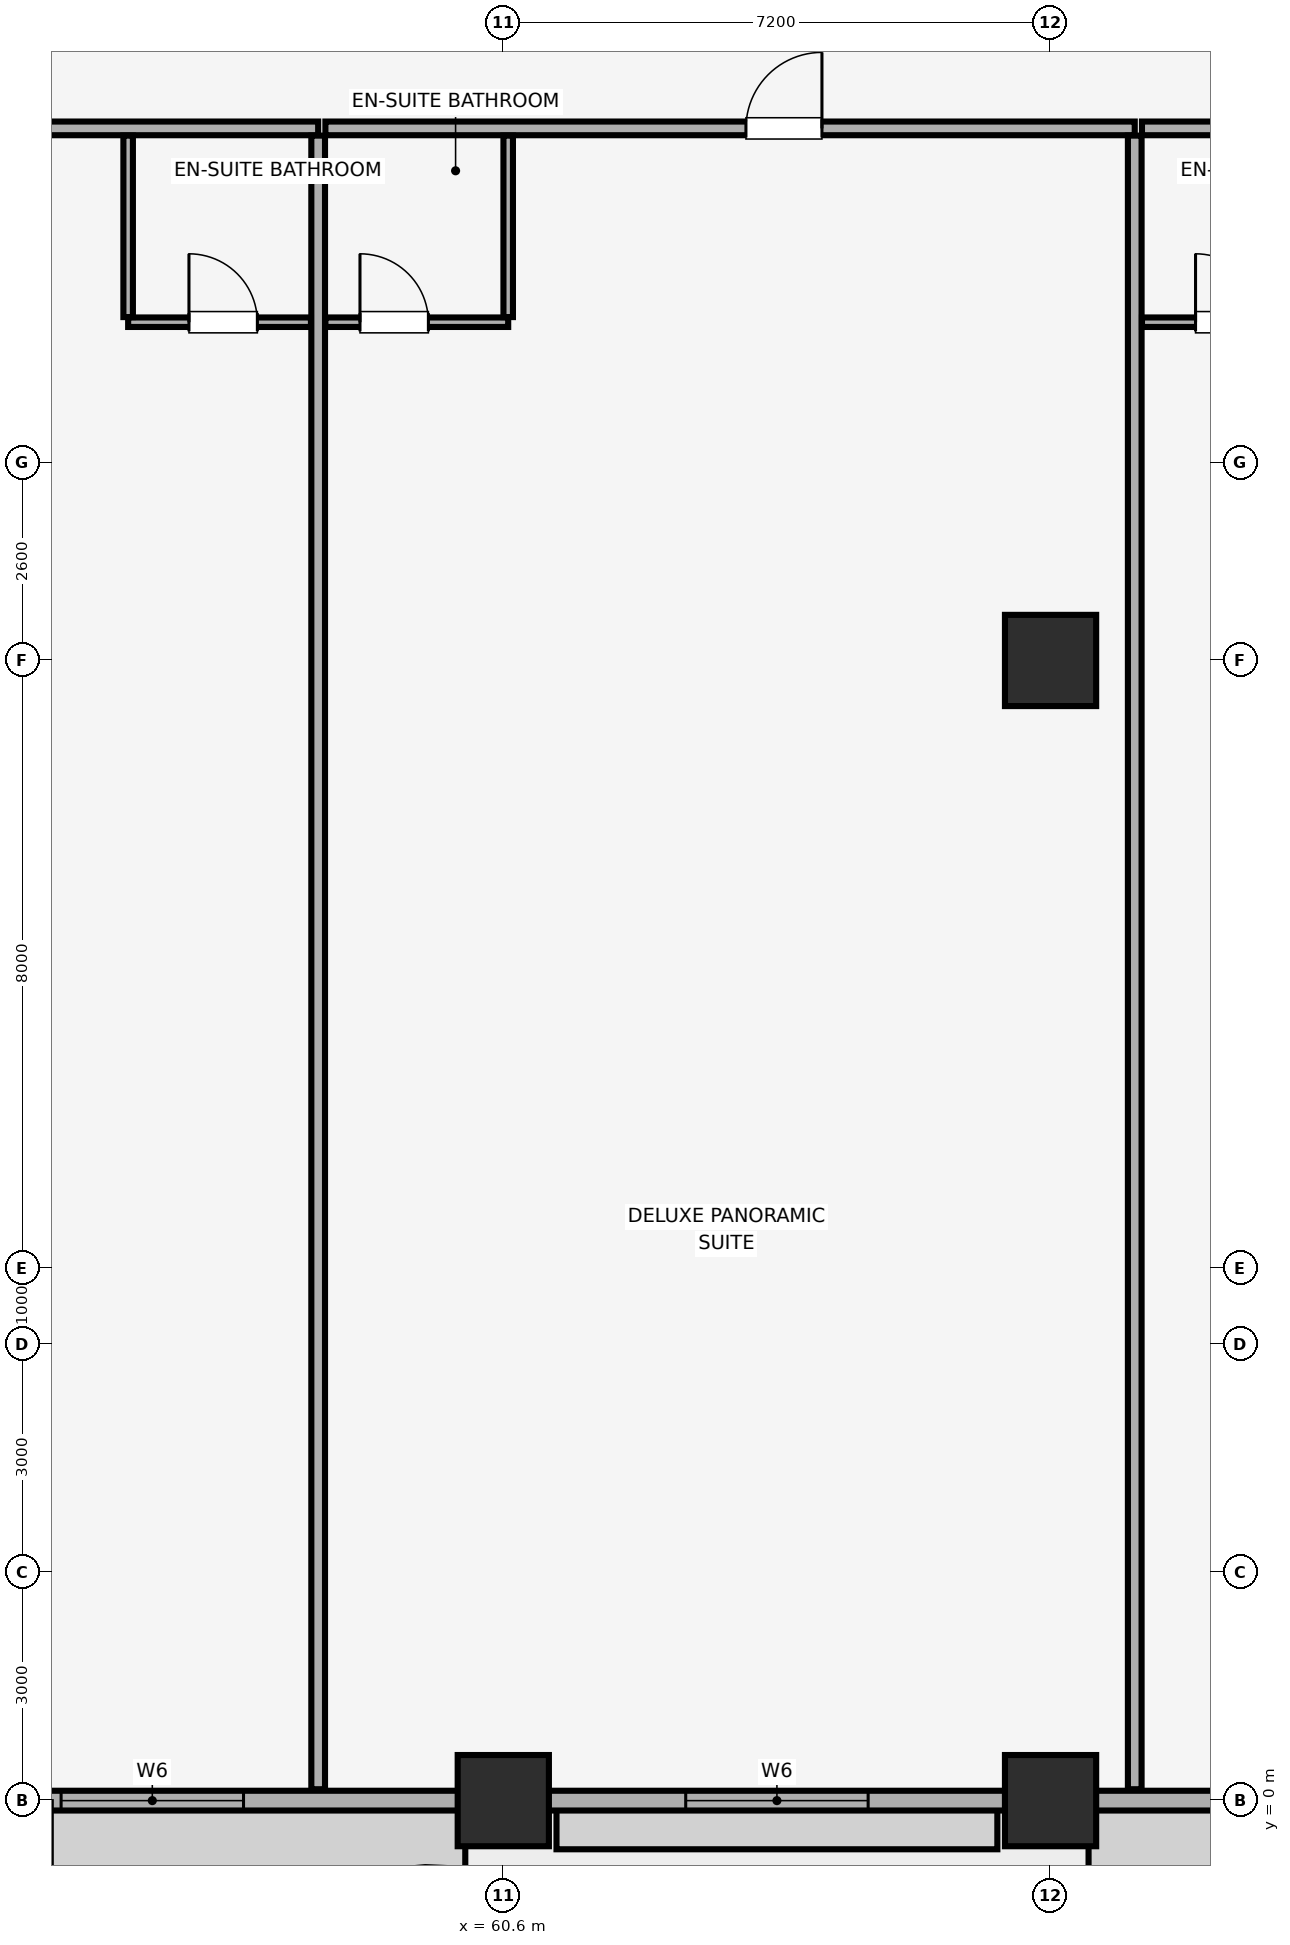
"""IFC4 building model, lengths in metres.
Left out: names, types, materials, properties, quantities, classifications, styles, units other than length and angle.
Written with IfcOpenShell. Run it as: python <this file> out.ifc"""

import sys

from ifc_helpers import new_model, si_unit, direction, frame, frame_2d, origin, origin_2d, place, context, subcontext, project, spatial, rectangle, extrude, element, fill, save


model = new_model("IFC4")
c1 = context("Model", 3, precision=1e-05, world=origin(), true_north=direction((0.0, 1.0)))
c2 = subcontext(c1, "Body", "Model", "MODEL_VIEW")
j1 = project(units=[si_unit("LENGTHUNIT", "METRE"), si_unit("PLANEANGLEUNIT", "RADIAN")], contexts=[c1])
p1 = place(None, origin())
s1 = spatial("IfcSite", under=j1, at=p1, CompositionType="ELEMENT")
p2 = place(p1, origin())
s2 = spatial("IfcBuilding", under=s1, at=p2, CompositionType="ELEMENT")
p3 = place(p2, frame((0.0, 0.0, 104.3)))
s3 = spatial("IfcBuildingStorey", under=s2, at=p3, CompositionType="ELEMENT", Elevation=104.3)
for number, where, z_axis, x_axis in (
    (1, (60.6, 0.0, 0.0), (0.0, 0.0, 1.0), (1.0, 0.0, 0.0)),
    (2, (67.8, 0.0, 0.0), (0.0, 0.0, 1.0), (1.0, 0.0, 0.0)),
    (3, (67.8, 15.0, 0.0), (0.0, 0.0, 1.0), (1.0, 0.0, 0.0)),
):
    element("IfcColumn", number, at=place(p3, frame(where, z_axis=z_axis, x_axis=x_axis)), inside=s3, PredefinedType="COLUMN", context=c2, shape_type="SweptSolid", body=[
        extrude(rectangle(XDim=1.2, YDim=1.2, at=origin_2d()), origin(), (0.0, 0.0, 1.0), 3.51),
    ])
p4 = place(p3, frame((4.2, 0.0, 0.0), z_axis=(0.0, 0.0, 1.0), x_axis=(1.0, 0.0, 0.0)))
e4 = element("IfcWall", 4, at=p4, inside=s3, PredefinedType="SOLIDWALL", context=c2, shape_type="SweptSolid", body=[
    extrude(rectangle(XDim=75.6, YDim=0.26, at=frame_2d((37.8, 0.0))), origin(), (0.0, 0.0, 1.0), 2.56),
])
p5 = place(p4, frame((22.948, 0.0, 0.0)))
e5 = element("IfcOpeningElement", 5, at=p5, cuts=e4, PredefinedType="OPENING", context=c2, shape_type="SweptSolid", body=[
    extrude(rectangle(XDim=1.1, YDim=2.15, at=frame_2d((0.55, 1.075))), frame((0.0, 0.14, 0.0), z_axis=(0.0, -1.0, 0.0), x_axis=(1.0, 0.0, 0.0)), (0.0, 0.0, 1.0), 0.28),
])
p6 = place(p4, frame((44.61, 0.0, 0.0)))
e6 = element("IfcOpeningElement", 6, at=p6, cuts=e4, PredefinedType="OPENING", context=c2, shape_type="SweptSolid", body=[
    extrude(rectangle(XDim=1.1, YDim=2.15, at=frame_2d((0.55, 1.075))), frame((0.0, 0.14, 0.0), z_axis=(0.0, -1.0, 0.0), x_axis=(1.0, 0.0, 0.0)), (0.0, 0.0, 1.0), 0.28),
])
p7 = place(p4, frame((66.272, 0.0, 0.0)))
e7 = element("IfcOpeningElement", 7, at=p7, cuts=e4, PredefinedType="OPENING", context=c2, shape_type="SweptSolid", body=[
    extrude(rectangle(XDim=1.1, YDim=2.15, at=frame_2d((0.55, 1.075))), frame((0.0, 0.14, 0.0), z_axis=(0.0, -1.0, 0.0), x_axis=(1.0, 0.0, 0.0)), (0.0, 0.0, 1.0), 0.28),
])
p8 = place(p4, frame((1.035, 0.0, 0.85)))
e8 = element("IfcOpeningElement", 8, at=p8, cuts=e4, PredefinedType="OPENING", context=c2, shape_type="SweptSolid", body=[
    extrude(rectangle(XDim=2.4, YDim=1.5, at=frame_2d((1.2, 0.75))), frame((0.0, 0.14, 0.0), z_axis=(0.0, -1.0, 0.0), x_axis=(1.0, 0.0, 0.0)), (0.0, 0.0, 1.0), 0.28),
])
p9 = place(p4, frame((6.896, 0.0, 0.85)))
e9 = element("IfcOpeningElement", 9, at=p9, cuts=e4, PredefinedType="OPENING", context=c2, shape_type="SweptSolid", body=[
    extrude(rectangle(XDim=2.4, YDim=1.5, at=frame_2d((1.2, 0.75))), frame((0.0, 0.14, 0.0), z_axis=(0.0, -1.0, 0.0), x_axis=(1.0, 0.0, 0.0)), (0.0, 0.0, 1.0), 0.28),
])
p10 = place(p4, frame((14.4, 0.0, 0.85)))
e10 = element("IfcOpeningElement", 10, at=p10, cuts=e4, PredefinedType="OPENING", context=c2, shape_type="SweptSolid", body=[
    extrude(rectangle(XDim=2.4, YDim=1.5, at=frame_2d((1.2, 0.75))), frame((0.0, 0.14, 0.0), z_axis=(0.0, -1.0, 0.0), x_axis=(1.0, 0.0, 0.0)), (0.0, 0.0, 1.0), 0.28),
])
p11 = place(p4, frame((28.439, 0.0, 0.85)))
e11 = element("IfcOpeningElement", 11, at=p11, cuts=e4, PredefinedType="OPENING", context=c2, shape_type="SweptSolid", body=[
    extrude(rectangle(XDim=2.4, YDim=1.5, at=frame_2d((1.2, 0.75))), frame((0.0, 0.14, 0.0), z_axis=(0.0, -1.0, 0.0), x_axis=(1.0, 0.0, 0.0)), (0.0, 0.0, 1.0), 0.28),
])
p12 = place(p4, frame((36.6, 0.0, 0.85)))
e12 = element("IfcOpeningElement", 12, at=p12, cuts=e4, PredefinedType="OPENING", context=c2, shape_type="SweptSolid", body=[
    extrude(rectangle(XDim=2.4, YDim=1.5, at=frame_2d((1.2, 0.75))), frame((0.0, 0.14, 0.0), z_axis=(0.0, -1.0, 0.0), x_axis=(1.0, 0.0, 0.0)), (0.0, 0.0, 1.0), 0.28),
])
p13 = place(p4, frame((46.59, 0.0, 0.85)))
e13 = element("IfcOpeningElement", 13, at=p13, cuts=e4, PredefinedType="OPENING", context=c2, shape_type="SweptSolid", body=[
    extrude(rectangle(XDim=1.5, YDim=1.4, at=frame_2d((0.75, 0.7))), frame((0.0, 0.14, 0.0), z_axis=(0.0, -1.0, 0.0), x_axis=(1.0, 0.0, 0.0)), (0.0, 0.0, 1.0), 0.28),
])
p14 = place(p4, frame((50.583, 0.0, 0.85)))
e14 = element("IfcOpeningElement", 14, at=p14, cuts=e4, PredefinedType="OPENING", context=c2, shape_type="SweptSolid", body=[
    extrude(rectangle(XDim=2.4, YDim=1.5, at=frame_2d((1.2, 0.75))), frame((0.0, 0.14, 0.0), z_axis=(0.0, -1.0, 0.0), x_axis=(1.0, 0.0, 0.0)), (0.0, 0.0, 1.0), 0.28),
])
p15 = place(p4, frame((58.8, 0.0, 0.85)))
e15 = element("IfcOpeningElement", 15, at=p15, cuts=e4, PredefinedType="OPENING", context=c2, shape_type="SweptSolid", body=[
    extrude(rectangle(XDim=2.4, YDim=1.5, at=frame_2d((1.2, 0.75))), frame((0.0, 0.14, 0.0), z_axis=(0.0, -1.0, 0.0), x_axis=(1.0, 0.0, 0.0)), (0.0, 0.0, 1.0), 0.28),
])
p16 = place(p4, frame((68.221, 0.0, 0.85)))
e16 = element("IfcOpeningElement", 16, at=p16, cuts=e4, PredefinedType="OPENING", context=c2, shape_type="SweptSolid", body=[
    extrude(rectangle(XDim=1.5, YDim=1.4, at=frame_2d((0.75, 0.7))), frame((0.0, 0.14, 0.0), z_axis=(0.0, -1.0, 0.0), x_axis=(1.0, 0.0, 0.0)), (0.0, 0.0, 1.0), 0.28),
])
p17 = place(p4, frame((72.165, 0.0, 0.85)))
e17 = element("IfcOpeningElement", 17, at=p17, cuts=e4, PredefinedType="OPENING", context=c2, shape_type="SweptSolid", body=[
    extrude(rectangle(XDim=2.4, YDim=1.5, at=frame_2d((1.2, 0.75))), frame((0.0, 0.14, 0.0), z_axis=(0.0, -1.0, 0.0), x_axis=(1.0, 0.0, 0.0)), (0.0, 0.0, 1.0), 0.28),
])
p18 = place(p3, frame((47.517, 22.0, 0.0), z_axis=(0.0, 0.0, 1.0), x_axis=(1.0, 0.0, 0.0)))
e18 = element("IfcWall", 18, at=p18, inside=s3, PredefinedType="PARTITIONING", context=c2, shape_type="SweptSolid", body=[
    extrude(rectangle(XDim=10.648, YDim=0.18, at=frame_2d((5.324, 0.0))), origin(), (0.0, 0.0, 1.0), 3.51),
])
p19 = place(p18, frame((2.004, 0.0, 0.0)))
e19 = element("IfcOpeningElement", 19, at=p19, cuts=e18, PredefinedType="OPENING", context=c2, shape_type="SweptSolid", body=[
    extrude(rectangle(XDim=1.0, YDim=2.15, at=frame_2d((0.5, 1.075))), frame((0.0, 0.1, 0.0), z_axis=(0.0, -1.0, 0.0), x_axis=(1.0, 0.0, 0.0)), (0.0, 0.0, 1.0), 0.2),
])
p20 = place(p3, frame((58.165, 0.15, 0.0), z_axis=(0.0, 0.0, 1.0), x_axis=(0.0, 1.0, 0.0)))
e20 = element("IfcWall", 20, at=p20, inside=s3, PredefinedType="PARTITIONING", context=c2, shape_type="SweptSolid", body=[
    extrude(rectangle(XDim=21.755, YDim=0.18, at=frame_2d((10.877, 0.0))), origin(), (0.0, 0.0, 1.0), 3.51),
])
p21 = place(p3, frame((55.665, 19.45, 0.0), z_axis=(0.0, 0.0, 1.0), x_axis=(1.0, 0.0, 0.0)))
e21 = element("IfcWall", 21, at=p21, inside=s3, PredefinedType="PARTITIONING", context=c2, shape_type="SweptSolid", body=[
    extrude(rectangle(XDim=2.405, YDim=0.125, at=frame_2d((1.203, 0.0))), origin(), (0.0, 0.0, 1.0), 3.51),
])
p22 = place(p21, frame((0.8, 0.0, 0.0)))
e22 = element("IfcOpeningElement", 22, at=p22, cuts=e21, PredefinedType="OPENING", context=c2, shape_type="SweptSolid", body=[
    extrude(rectangle(XDim=0.9, YDim=2.1, at=frame_2d((0.45, 1.05))), frame((0.0, 0.073, 0.0), z_axis=(0.0, -1.0, 0.0), x_axis=(1.0, 0.0, 0.0)), (0.0, 0.0, 1.0), 0.145),
])
p23 = place(p3, frame((55.665, 19.518, 0.0), z_axis=(0.0, 0.0, 1.0), x_axis=(0.0, 1.0, 0.0)))
e23 = element("IfcWall", 23, at=p23, inside=s3, PredefinedType="PARTITIONING", context=c2, shape_type="SweptSolid", body=[
    extrude(rectangle(XDim=2.387, YDim=0.125, at=frame_2d((1.194, 0.0))), origin(), (0.0, 0.0, 1.0), 3.51),
])
p24 = place(p3, frame((58.26, 22.0, 0.0), z_axis=(0.0, 0.0, 1.0), x_axis=(1.0, 0.0, 0.0)))
e24 = element("IfcWall", 24, at=p24, inside=s3, PredefinedType="PARTITIONING", context=c2, shape_type="SweptSolid", body=[
    extrude(rectangle(XDim=10.648, YDim=0.18, at=frame_2d((5.324, 0.0))), origin(), (0.0, 0.0, 1.0), 3.51),
])
p25 = place(p24, frame((5.533, 0.0, 0.0)))
e25 = element("IfcOpeningElement", 25, at=p25, cuts=e24, PredefinedType="OPENING", context=c2, shape_type="SweptSolid", body=[
    extrude(rectangle(XDim=1.0, YDim=2.15, at=frame_2d((0.5, 1.075))), frame((0.0, 0.1, 0.0), z_axis=(0.0, -1.0, 0.0), x_axis=(1.0, 0.0, 0.0)), (0.0, 0.0, 1.0), 0.2),
])
p26 = place(p3, frame((68.907, 0.15, 0.0), z_axis=(0.0, 0.0, 1.0), x_axis=(0.0, 1.0, 0.0)))
e26 = element("IfcWall", 26, at=p26, inside=s3, PredefinedType="PARTITIONING", context=c2, shape_type="SweptSolid", body=[
    extrude(rectangle(XDim=21.755, YDim=0.18, at=frame_2d((10.877, 0.0))), origin(), (0.0, 0.0, 1.0), 3.51),
])
p27 = place(p3, frame((58.26, 19.45, 0.0), z_axis=(0.0, 0.0, 1.0), x_axis=(1.0, 0.0, 0.0)))
e27 = element("IfcWall", 27, at=p27, inside=s3, PredefinedType="PARTITIONING", context=c2, shape_type="SweptSolid", body=[
    extrude(rectangle(XDim=2.405, YDim=0.125, at=frame_2d((1.203, 0.0))), origin(), (0.0, 0.0, 1.0), 3.51),
])
p28 = place(p27, frame((0.455, 0.0, 0.0)))
e28 = element("IfcOpeningElement", 28, at=p28, cuts=e27, PredefinedType="OPENING", context=c2, shape_type="SweptSolid", body=[
    extrude(rectangle(XDim=0.9, YDim=2.1, at=frame_2d((0.45, 1.05))), frame((0.0, 0.073, 0.0), z_axis=(0.0, -1.0, 0.0), x_axis=(1.0, 0.0, 0.0)), (0.0, 0.0, 1.0), 0.145),
])
p29 = place(p3, frame((60.665, 19.518, 0.0), z_axis=(0.0, 0.0, 1.0), x_axis=(0.0, 1.0, 0.0)))
e29 = element("IfcWall", 29, at=p29, inside=s3, PredefinedType="PARTITIONING", context=c2, shape_type="SweptSolid", body=[
    extrude(rectangle(XDim=2.387, YDim=0.125, at=frame_2d((1.194, 0.0))), origin(), (0.0, 0.0, 1.0), 2.977),
])
p30 = place(p3, frame((69.002, 22.0, 0.0), z_axis=(0.0, 0.0, 1.0), x_axis=(1.0, 0.0, 0.0)))
e30 = element("IfcWall", 30, at=p30, inside=s3, PredefinedType="PARTITIONING", context=c2, shape_type="SweptSolid", body=[
    extrude(rectangle(XDim=14.848, YDim=0.18, at=frame_2d((7.424, 0.0))), origin(), (0.0, 0.0, 1.0), 3.51),
])
p31 = place(p30, frame((8.163, 0.0, 0.0)))
e31 = element("IfcOpeningElement", 31, at=p31, cuts=e30, PredefinedType="OPENING", context=c2, shape_type="SweptSolid", body=[
    extrude(rectangle(XDim=1.0, YDim=2.15, at=frame_2d((0.5, 1.075))), frame((0.0, 0.1, 0.0), z_axis=(0.0, -1.0, 0.0), x_axis=(1.0, 0.0, 0.0)), (0.0, 0.0, 1.0), 0.2),
])
p32 = place(p3, frame((69.002, 19.45, 0.0), z_axis=(0.0, 0.0, 1.0), x_axis=(1.0, 0.0, 0.0)))
e32 = element("IfcWall", 32, at=p32, inside=s3, PredefinedType="PARTITIONING", context=c2, shape_type="SweptSolid", body=[
    extrude(rectangle(XDim=2.405, YDim=0.125, at=frame_2d((1.203, 0.0))), origin(), (0.0, 0.0, 1.0), 3.51),
])
p33 = place(p32, frame((0.705, 0.0, 0.0)))
e33 = element("IfcOpeningElement", 33, at=p33, cuts=e32, PredefinedType="OPENING", context=c2, shape_type="SweptSolid", body=[
    extrude(rectangle(XDim=0.9, YDim=2.1, at=frame_2d((0.45, 1.05))), frame((0.0, 0.073, 0.0), z_axis=(0.0, -1.0, 0.0), x_axis=(1.0, 0.0, 0.0)), (0.0, 0.0, 1.0), 0.145),
])
p34 = place(p14, origin())
e34 = element("IfcWindow", 34, at=p34, inside=s3, PartitioningType="SINGLE_PANEL", PredefinedType="WINDOW", context=c2, shape_type="SweptSolid", body=[
    extrude(rectangle(XDim=2.4, YDim=1.5, at=frame_2d((1.2, 0.75))), frame((0.0, 0.03, 0.0), z_axis=(0.0, -1.0, 0.0), x_axis=(1.0, 0.0, 0.0)), (0.0, 0.0, 1.0), 0.06),
])
fill(e14, e34)
p35 = place(p15, origin())
e35 = element("IfcWindow", 35, at=p35, inside=s3, PartitioningType="SINGLE_PANEL", PredefinedType="WINDOW", context=c2, shape_type="SweptSolid", body=[
    extrude(rectangle(XDim=2.4, YDim=1.5, at=frame_2d((1.2, 0.75))), frame((0.0, 0.03, 0.0), z_axis=(0.0, -1.0, 0.0), x_axis=(1.0, 0.0, 0.0)), (0.0, 0.0, 1.0), 0.06),
])
fill(e15, e35)
p36 = place(p22, origin())
e36 = element("IfcDoor", 36, at=p36, inside=s3, OperationType="SINGLE_SWING_LEFT", PredefinedType="DOOR", context=c2, shape_type="SweptSolid", body=[
    extrude(rectangle(XDim=0.9, YDim=2.1, at=frame_2d((0.45, 1.05))), frame((0.0, 0.025, 0.0), z_axis=(0.0, -1.0, 0.0), x_axis=(1.0, 0.0, 0.0)), (0.0, 0.0, 1.0), 0.05),
])
fill(e22, e36)
p37 = place(p25, origin())
e37 = element("IfcDoor", 37, at=p37, inside=s3, OperationType="SINGLE_SWING_RIGHT", PredefinedType="DOOR", context=c2, shape_type="SweptSolid", body=[
    extrude(rectangle(XDim=1.0, YDim=2.15, at=frame_2d((0.5, 1.075))), frame((0.0, 0.025, 0.0), z_axis=(0.0, -1.0, 0.0), x_axis=(1.0, 0.0, 0.0)), (0.0, 0.0, 1.0), 0.05),
])
fill(e25, e37)
p38 = place(p28, origin())
e38 = element("IfcDoor", 38, at=p38, inside=s3, OperationType="SINGLE_SWING_LEFT", PredefinedType="DOOR", context=c2, shape_type="SweptSolid", body=[
    extrude(rectangle(XDim=0.9, YDim=2.1, at=frame_2d((0.45, 1.05))), frame((0.0, 0.025, 0.0), z_axis=(0.0, -1.0, 0.0), x_axis=(1.0, 0.0, 0.0)), (0.0, 0.0, 1.0), 0.05),
])
fill(e28, e38)
p39 = place(p33, origin())
e39 = element("IfcDoor", 39, at=p39, inside=s3, OperationType="SINGLE_SWING_LEFT", PredefinedType="DOOR", context=c2, shape_type="SweptSolid", body=[
    extrude(rectangle(XDim=0.9, YDim=2.1, at=frame_2d((0.45, 1.05))), frame((0.0, 0.025, 0.0), z_axis=(0.0, -1.0, 0.0), x_axis=(1.0, 0.0, 0.0)), (0.0, 0.0, 1.0), 0.05),
])
fill(e33, e39)
save(model, sys.argv[1])
